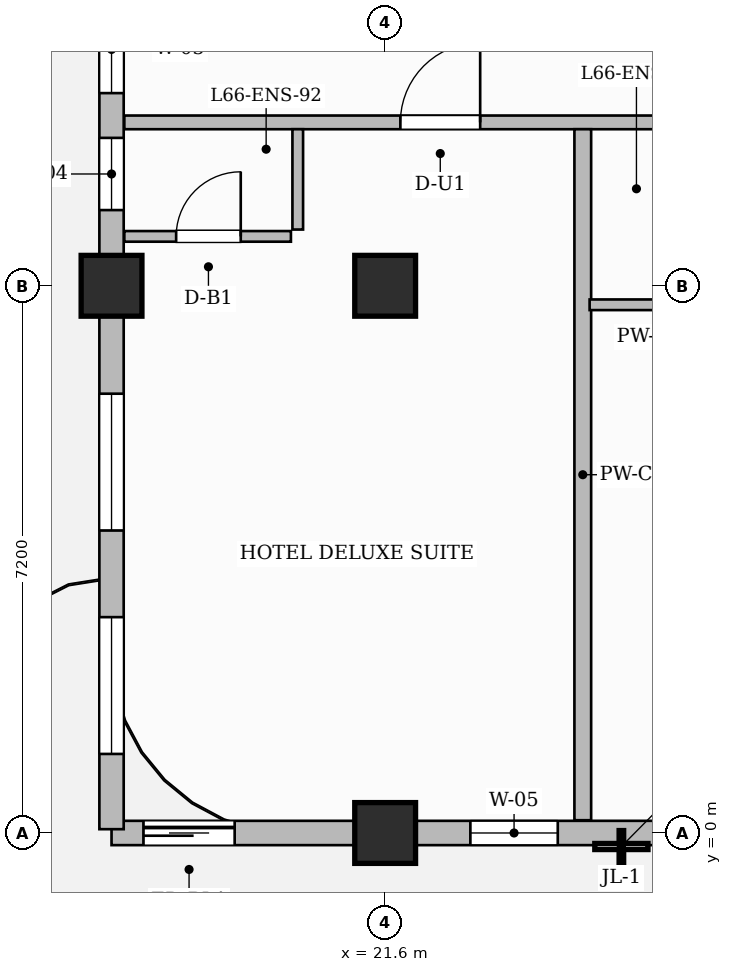
"""IFC4 building model, lengths in metres.
Left out: names, types, materials, properties, quantities, classifications, styles, units other than length and angle.
Written with IfcOpenShell. Run it as: python <this file> out.ifc"""

import sys

from ifc_helpers import new_model, si_unit, direction, frame, frame_2d, origin, origin_2d, place, context, subcontext, project, spatial, rectangle, extrude, source, transform, mapped, element, fill, save


model = new_model("IFC4")
c1 = context("Model", 3, precision=1e-05, world=origin(), true_north=direction((0.0, 1.0)))
c2 = subcontext(c1, "Body", "Model", "MODEL_VIEW")
j1 = project(units=[si_unit("LENGTHUNIT", "METRE"), si_unit("PLANEANGLEUNIT", "RADIAN")], contexts=[c1])
p1 = place(None, origin())
s1 = spatial("IfcSite", under=j1, at=p1, CompositionType="ELEMENT")
p2 = place(p1, origin())
s2 = spatial("IfcBuilding", under=s1, at=p2, CompositionType="ELEMENT")
p3 = place(p2, frame((0.0, 0.0, 263.5)))
s3 = spatial("IfcBuildingStorey", under=s2, at=p3, CompositionType="ELEMENT", Elevation=263.5)
m1 = source(origin(), c2, "Body", "SweptSolid", [
    extrude(rectangle(XDim=0.8, YDim=0.8, at=origin_2d()), origin(), (0.0, 0.0, 1.0), 3.85),
])
for number, where, z_axis, x_axis in (
    (1, (21.6, 0.0, 0.0), (0.0, 0.0, 1.0), (1.0, 0.0, 0.0)),
    (2, (21.6, 7.2, 0.0), (0.0, 0.0, 1.0), (1.0, 0.0, 0.0)),
    (3, (18.0, 7.2, 0.0), (0.0, 0.0, 1.0), (1.0, 0.0, 0.0)),
):
    element("IfcColumn", number, at=place(p3, frame(where, z_axis=z_axis, x_axis=x_axis)), inside=s3, PredefinedType="COLUMN", context=c2, shape_type="MappedRepresentation", body=[
        mapped(m1, transform((0.0, 0.0, 0.0), scale=1.0)),
    ])
p4 = place(p3, frame((18.168, 9.35, 0.0), z_axis=(0.0, 0.0, 1.0), x_axis=(1.0, 0.0, 0.0)))
e4 = element("IfcWall", 4, at=p4, inside=s3, PredefinedType="PARTITIONING", context=c2, shape_type="SweptSolid", body=[
    extrude(rectangle(XDim=11.942, YDim=0.18, at=frame_2d((5.971, 0.0))), origin(), (0.0, 0.0, 1.0), 3.6),
])
p5 = place(p4, frame((3.632, 0.0, 0.0)))
e5 = element("IfcOpeningElement", 5, at=p5, cuts=e4, PredefinedType="OPENING", context=c2, shape_type="SweptSolid", body=[
    extrude(rectangle(XDim=1.05, YDim=2.25, at=frame_2d((0.525, 1.125))), frame((0.0, 0.1, 0.0), z_axis=(0.0, -1.0, 0.0), x_axis=(1.0, 0.0, 0.0)), (0.0, 0.0, 1.0), 0.2),
])
p6 = place(p4, frame((9.682, 0.0, 0.0)))
e6 = element("IfcOpeningElement", 6, at=p6, cuts=e4, PredefinedType="OPENING", context=c2, shape_type="SweptSolid", body=[
    extrude(rectangle(XDim=1.0, YDim=2.2, at=frame_2d((0.5, 1.1))), frame((0.0, 0.1, 0.0), z_axis=(0.0, -1.0, 0.0), x_axis=(1.0, 0.0, 0.0)), (0.0, 0.0, 1.0), 0.2),
])
p7 = place(p3, frame((24.2, 0.168, 0.0), z_axis=(0.0, 0.0, 1.0), x_axis=(0.0, 1.0, 0.0)))
e7 = element("IfcWall", 7, at=p7, inside=s3, PredefinedType="PARTITIONING", context=c2, shape_type="SweptSolid", body=[
    extrude(rectangle(XDim=9.092, YDim=0.22, at=frame_2d((4.546, 0.0))), origin(), (0.0, 0.0, 1.0), 3.6),
])
p8 = place(p3, frame((20.45, 7.94, 0.0), z_axis=(0.0, 0.0, 1.0), x_axis=(0.0, 1.0, 0.0)))
e8 = element("IfcWall", 8, at=p8, inside=s3, PredefinedType="PARTITIONING", context=c2, shape_type="SweptSolid", body=[
    extrude(rectangle(XDim=1.32, YDim=0.14, at=frame_2d((0.66, 0.0))), origin(), (0.0, 0.0, 1.0), 3.6),
])
p9 = place(p3, frame((18.168, 7.85, 0.0), z_axis=(0.0, 0.0, 1.0), x_axis=(1.0, 0.0, 0.0)))
e9 = element("IfcWall", 9, at=p9, inside=s3, PredefinedType="PARTITIONING", context=c2, shape_type="SweptSolid", body=[
    extrude(rectangle(XDim=2.192, YDim=0.14, at=frame_2d((1.096, 0.0))), origin(), (0.0, 0.0, 1.0), 3.6),
])
p10 = place(p9, frame((0.682, 0.0, 0.0)))
e10 = element("IfcOpeningElement", 10, at=p10, cuts=e9, PredefinedType="OPENING", context=c2, shape_type="SweptSolid", body=[
    extrude(rectangle(XDim=0.85, YDim=2.1, at=frame_2d((0.425, 1.05))), frame((0.0, 0.08, 0.0), z_axis=(0.0, -1.0, 0.0), x_axis=(1.0, 0.0, 0.0)), (0.0, 0.0, 1.0), 0.16),
])
p11 = place(p3, frame((24.29, 6.95, 0.0), z_axis=(0.0, 0.0, 1.0), x_axis=(1.0, 0.0, 0.0)))
e11 = element("IfcWall", 11, at=p11, inside=s3, PredefinedType="PARTITIONING", context=c2, shape_type="SweptSolid", body=[
    extrude(rectangle(XDim=2.12, YDim=0.14, at=frame_2d((1.06, 0.0))), origin(), (0.0, 0.0, 1.0), 3.185),
])
p12 = place(p3, frame((18.0, 0.0, 0.0), z_axis=(0.0, 0.0, 1.0), x_axis=(1.0, 0.0, 0.0)))
e12 = element("IfcWall", 12, at=p12, inside=s3, PredefinedType="SOLIDWALL", context=c2, shape_type="SweptSolid", body=[
    extrude(rectangle(XDim=31.8, YDim=0.32, at=frame_2d((15.9, 0.0))), origin(), (0.0, 0.0, 1.0), 3.185),
])
p13 = place(p12, frame((0.42, 0.0, 0.0)))
e13 = element("IfcOpeningElement", 13, at=p13, cuts=e12, PredefinedType="OPENING", context=c2, shape_type="SweptSolid", body=[
    extrude(rectangle(XDim=1.2, YDim=2.2, at=frame_2d((0.6, 1.1))), frame((0.0, 0.17, 0.0), z_axis=(0.0, -1.0, 0.0), x_axis=(1.0, 0.0, 0.0)), (0.0, 0.0, 1.0), 0.34),
])
p14 = place(p12, frame((4.721, 0.0, 0.8)))
e14 = element("IfcOpeningElement", 14, at=p14, cuts=e12, PredefinedType="OPENING", context=c2, shape_type="SweptSolid", body=[
    extrude(rectangle(XDim=1.15, YDim=1.8, at=frame_2d((0.575, 0.9))), frame((0.0, 0.17, 0.0), z_axis=(0.0, -1.0, 0.0), x_axis=(1.0, 0.0, 0.0)), (0.0, 0.0, 1.0), 0.34),
])
p15 = place(p12, frame((7.204, 0.0, 0.8)))
e15 = element("IfcOpeningElement", 15, at=p15, cuts=e12, PredefinedType="OPENING", context=c2, shape_type="SweptSolid", body=[
    extrude(rectangle(XDim=1.8, YDim=1.85, at=frame_2d((0.9, 0.925))), frame((0.0, 0.17, 0.0), z_axis=(0.0, -1.0, 0.0), x_axis=(1.0, 0.0, 0.0)), (0.0, 0.0, 1.0), 0.34),
])
p16 = place(p12, frame((13.204, 0.0, 0.8)))
e16 = element("IfcOpeningElement", 16, at=p16, cuts=e12, PredefinedType="OPENING", context=c2, shape_type="SweptSolid", body=[
    extrude(rectangle(XDim=1.8, YDim=1.85, at=frame_2d((0.9, 0.925))), frame((0.0, 0.17, 0.0), z_axis=(0.0, -1.0, 0.0), x_axis=(1.0, 0.0, 0.0)), (0.0, 0.0, 1.0), 0.34),
])
p17 = place(p12, frame((17.921, 0.0, 0.8)))
e17 = element("IfcOpeningElement", 17, at=p17, cuts=e12, PredefinedType="OPENING", context=c2, shape_type="SweptSolid", body=[
    extrude(rectangle(XDim=0.95, YDim=1.75, at=frame_2d((0.475, 0.875))), frame((0.0, 0.17, 0.0), z_axis=(0.0, -1.0, 0.0), x_axis=(1.0, 0.0, 0.0)), (0.0, 0.0, 1.0), 0.34),
])
p18 = place(p12, frame((20.304, 0.0, 0.8)))
e18 = element("IfcOpeningElement", 18, at=p18, cuts=e12, PredefinedType="OPENING", context=c2, shape_type="SweptSolid", body=[
    extrude(rectangle(XDim=1.8, YDim=1.85, at=frame_2d((0.9, 0.925))), frame((0.0, 0.17, 0.0), z_axis=(0.0, -1.0, 0.0), x_axis=(1.0, 0.0, 0.0)), (0.0, 0.0, 1.0), 0.34),
])
p19 = place(p12, frame((26.081, 0.0, 0.8)))
e19 = element("IfcOpeningElement", 19, at=p19, cuts=e12, PredefinedType="OPENING", context=c2, shape_type="SweptSolid", body=[
    extrude(rectangle(XDim=1.8, YDim=1.85, at=frame_2d((0.9, 0.925))), frame((0.0, 0.17, 0.0), z_axis=(0.0, -1.0, 0.0), x_axis=(1.0, 0.0, 0.0)), (0.0, 0.0, 1.0), 0.34),
])
p20 = place(p12, frame((28.727, 0.0, 0.8)))
e20 = element("IfcOpeningElement", 20, at=p20, cuts=e12, PredefinedType="OPENING", context=c2, shape_type="SweptSolid", body=[
    extrude(rectangle(XDim=1.8, YDim=1.85, at=frame_2d((0.9, 0.925))), frame((0.0, 0.17, 0.0), z_axis=(0.0, -1.0, 0.0), x_axis=(1.0, 0.0, 0.0)), (0.0, 0.0, 1.0), 0.34),
])
p21 = place(p3, frame((18.0, 0.05, 0.0), z_axis=(0.0, 0.0, 1.0), x_axis=(0.0, 1.0, 0.0)))
e21 = element("IfcWall", 21, at=p21, inside=s3, PredefinedType="SOLIDWALL", context=c2, shape_type="SweptSolid", body=[
    extrude(rectangle(XDim=21.5, YDim=0.32, at=frame_2d((10.75, 0.0))), origin(), (0.0, 0.0, 1.0), 3.6),
])
p22 = place(p21, frame((0.99, 0.0, 0.8)))
e22 = element("IfcOpeningElement", 22, at=p22, cuts=e21, PredefinedType="OPENING", context=c2, shape_type="SweptSolid", body=[
    extrude(rectangle(XDim=1.8, YDim=1.85, at=frame_2d((0.9, 0.925))), frame((0.0, 0.17, 0.0), z_axis=(0.0, -1.0, 0.0), x_axis=(1.0, 0.0, 0.0)), (0.0, 0.0, 1.0), 0.34),
])
p23 = place(p21, frame((3.93, 0.0, 0.8)))
e23 = element("IfcOpeningElement", 23, at=p23, cuts=e21, PredefinedType="OPENING", context=c2, shape_type="SweptSolid", body=[
    extrude(rectangle(XDim=1.8, YDim=1.85, at=frame_2d((0.9, 0.925))), frame((0.0, 0.17, 0.0), z_axis=(0.0, -1.0, 0.0), x_axis=(1.0, 0.0, 0.0)), (0.0, 0.0, 1.0), 0.34),
])
p24 = place(p21, frame((8.146, 0.0, 0.8)))
e24 = element("IfcOpeningElement", 24, at=p24, cuts=e21, PredefinedType="OPENING", context=c2, shape_type="SweptSolid", body=[
    extrude(rectangle(XDim=0.95, YDim=1.75, at=frame_2d((0.475, 0.875))), frame((0.0, 0.17, 0.0), z_axis=(0.0, -1.0, 0.0), x_axis=(1.0, 0.0, 0.0)), (0.0, 0.0, 1.0), 0.34),
])
p25 = place(p21, frame((9.685, 0.0, 0.8)))
e25 = element("IfcOpeningElement", 25, at=p25, cuts=e21, PredefinedType="OPENING", context=c2, shape_type="SweptSolid", body=[
    extrude(rectangle(XDim=1.15, YDim=1.8, at=frame_2d((0.575, 0.9))), frame((0.0, 0.17, 0.0), z_axis=(0.0, -1.0, 0.0), x_axis=(1.0, 0.0, 0.0)), (0.0, 0.0, 1.0), 0.34),
])
p26 = place(p21, frame((11.689, 0.0, 0.8)))
e26 = element("IfcOpeningElement", 26, at=p26, cuts=e21, PredefinedType="OPENING", context=c2, shape_type="SweptSolid", body=[
    extrude(rectangle(XDim=1.4, YDim=1.85, at=frame_2d((0.7, 0.925))), frame((0.0, 0.17, 0.0), z_axis=(0.0, -1.0, 0.0), x_axis=(1.0, 0.0, 0.0)), (0.0, 0.0, 1.0), 0.34),
])
p27 = place(p21, frame((15.77, 0.0, 0.8)))
e27 = element("IfcOpeningElement", 27, at=p27, cuts=e21, PredefinedType="OPENING", context=c2, shape_type="SweptSolid", body=[
    extrude(rectangle(XDim=1.8, YDim=1.85, at=frame_2d((0.9, 0.925))), frame((0.0, 0.17, 0.0), z_axis=(0.0, -1.0, 0.0), x_axis=(1.0, 0.0, 0.0)), (0.0, 0.0, 1.0), 0.34),
])
p28 = place(p21, frame((18.71, 0.0, 0.8)))
e28 = element("IfcOpeningElement", 28, at=p28, cuts=e21, PredefinedType="OPENING", context=c2, shape_type="SweptSolid", body=[
    extrude(rectangle(XDim=1.8, YDim=1.85, at=frame_2d((0.9, 0.925))), frame((0.0, 0.17, 0.0), z_axis=(0.0, -1.0, 0.0), x_axis=(1.0, 0.0, 0.0)), (0.0, 0.0, 1.0), 0.34),
])
m2 = source(origin(), c2, "Body", "SweptSolid", [
    extrude(rectangle(XDim=0.85, YDim=2.1, at=frame_2d((0.425, 1.05))), frame((0.0, 0.025, 0.0), z_axis=(0.0, -1.0, 0.0), x_axis=(1.0, 0.0, 0.0)), (0.0, 0.0, 1.0), 0.05),
])
p29 = place(p10, origin())
e29 = element("IfcDoor", 29, at=p29, inside=s3, OperationType="SINGLE_SWING_RIGHT", PredefinedType="DOOR", context=c2, shape_type="MappedRepresentation", body=[
    mapped(m2, transform((0.0, 0.0, 0.0), scale=1.0)),
])
fill(e10, e29)
m3 = source(origin(), c2, "Body", "SweptSolid", [
    extrude(rectangle(XDim=1.05, YDim=2.25, at=frame_2d((0.525, 1.125))), frame((0.0, 0.025, 0.0), z_axis=(0.0, -1.0, 0.0), x_axis=(1.0, 0.0, 0.0)), (0.0, 0.0, 1.0), 0.05),
])
p30 = place(p5, origin())
e30 = element("IfcDoor", 30, at=p30, inside=s3, OperationType="SINGLE_SWING_RIGHT", PredefinedType="DOOR", context=c2, shape_type="MappedRepresentation", body=[
    mapped(m3, transform((0.0, 0.0, 0.0), scale=1.0)),
])
fill(e5, e30)
m4 = source(origin(), c2, "Body", "SweptSolid", [
    extrude(rectangle(XDim=1.2, YDim=2.2, at=frame_2d((0.6, 1.1))), frame((0.0, 0.025, 0.0), z_axis=(0.0, -1.0, 0.0), x_axis=(1.0, 0.0, 0.0)), (0.0, 0.0, 1.0), 0.05),
])
p31 = place(p13, origin())
e31 = element("IfcDoor", 31, at=p31, inside=s3, OperationType="SLIDING_TO_LEFT", PredefinedType="DOOR", context=c2, shape_type="MappedRepresentation", body=[
    mapped(m4, transform((0.0, 0.0, 0.0), scale=1.0)),
])
fill(e13, e31)
m5 = source(origin(), c2, "Body", "SweptSolid", [
    extrude(rectangle(XDim=1.15, YDim=1.8, at=frame_2d((0.575, 0.9))), frame((0.0, 0.03, 0.0), z_axis=(0.0, -1.0, 0.0), x_axis=(1.0, 0.0, 0.0)), (0.0, 0.0, 1.0), 0.06),
])
p32 = place(p14, origin())
e32 = element("IfcWindow", 32, at=p32, inside=s3, PartitioningType="SINGLE_PANEL", PredefinedType="WINDOW", context=c2, shape_type="MappedRepresentation", body=[
    mapped(m5, transform((0.0, 0.0, 0.0), scale=1.0)),
])
fill(e14, e32)
m6 = source(origin(), c2, "Body", "SweptSolid", [
    extrude(rectangle(XDim=1.8, YDim=1.85, at=frame_2d((0.9, 0.925))), frame((0.0, 0.03, 0.0), z_axis=(0.0, -1.0, 0.0), x_axis=(1.0, 0.0, 0.0)), (0.0, 0.0, 1.0), 0.06),
])
p33 = place(p22, origin())
e33 = element("IfcWindow", 33, at=p33, inside=s3, PartitioningType="DOUBLE_PANEL_VERTICAL", PredefinedType="WINDOW", context=c2, shape_type="MappedRepresentation", body=[
    mapped(m6, transform((0.0, 0.0, 0.0), scale=1.0)),
])
fill(e22, e33)
p34 = place(p23, origin())
e34 = element("IfcWindow", 34, at=p34, inside=s3, PartitioningType="DOUBLE_PANEL_VERTICAL", PredefinedType="WINDOW", context=c2, shape_type="MappedRepresentation", body=[
    mapped(m6, transform((0.0, 0.0, 0.0), scale=1.0)),
])
fill(e23, e34)
m7 = source(origin(), c2, "Body", "SweptSolid", [
    extrude(rectangle(XDim=0.95, YDim=1.75, at=frame_2d((0.475, 0.875))), frame((0.0, 0.03, 0.0), z_axis=(0.0, -1.0, 0.0), x_axis=(1.0, 0.0, 0.0)), (0.0, 0.0, 1.0), 0.06),
])
p35 = place(p24, origin())
e35 = element("IfcWindow", 35, at=p35, inside=s3, PartitioningType="SINGLE_PANEL", PredefinedType="WINDOW", context=c2, shape_type="MappedRepresentation", body=[
    mapped(m7, transform((0.0, 0.0, 0.0), scale=1.0)),
])
fill(e24, e35)
p36 = place(p25, origin())
e36 = element("IfcWindow", 36, at=p36, inside=s3, PartitioningType="SINGLE_PANEL", PredefinedType="WINDOW", context=c2, shape_type="MappedRepresentation", body=[
    mapped(m5, transform((0.0, 0.0, 0.0), scale=1.0)),
])
fill(e25, e36)
save(model, sys.argv[1])
